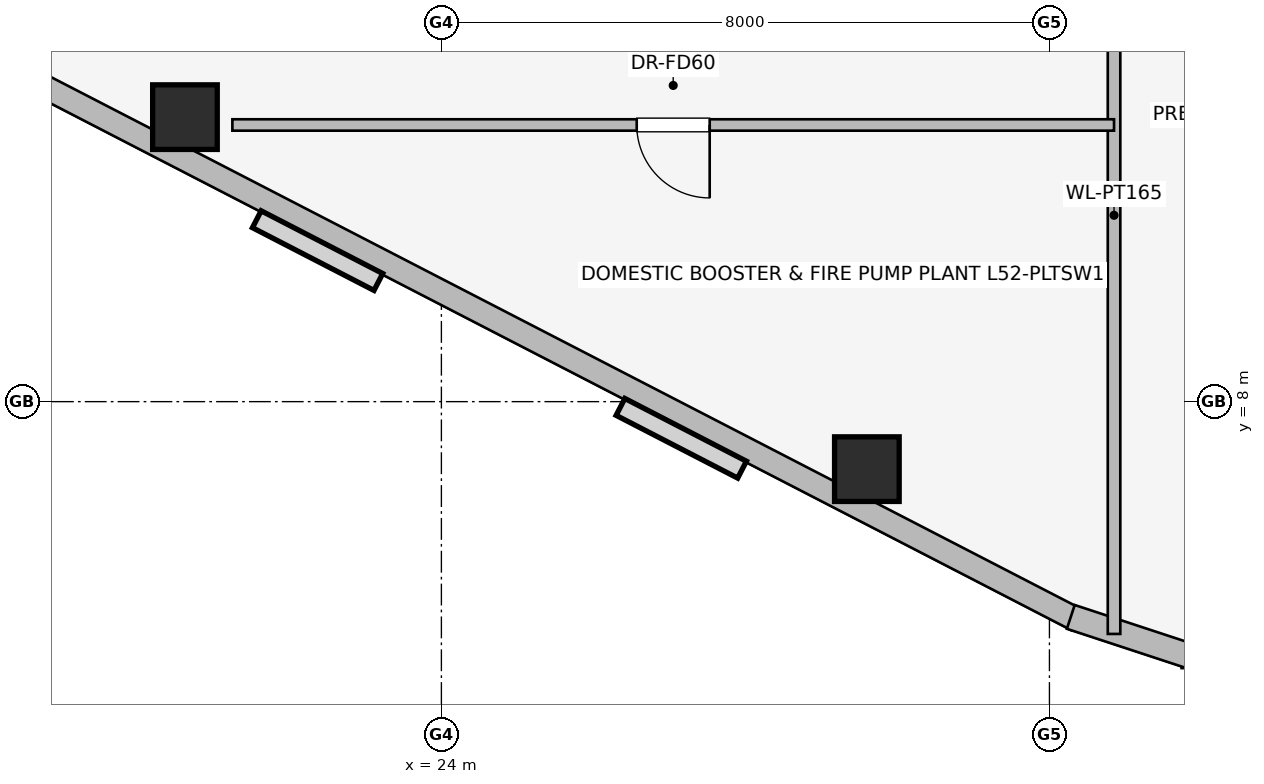
"""IFC4 building model, lengths in metres.
Left out: names, types, materials, properties, quantities, classifications, styles, units other than length and angle.
Written with IfcOpenShell. Run it as: python <this file> out.ifc"""

import sys

from ifc_helpers import new_model, si_unit, direction, frame, frame_2d, origin, origin_2d, place, context, subcontext, project, spatial, rectangle, extrude, element, fill, save


model = new_model("IFC4")
c1 = context("Model", 3, precision=1e-05, world=origin(), true_north=direction((0.0, 1.0)))
c2 = subcontext(c1, "Body", "Model", "MODEL_VIEW")
j1 = project(units=[si_unit("LENGTHUNIT", "METRE"), si_unit("PLANEANGLEUNIT", "RADIAN")], contexts=[c1])
p1 = place(None, origin())
s1 = spatial("IfcSite", under=j1, at=p1, CompositionType="ELEMENT")
p2 = place(p1, origin())
s2 = spatial("IfcBuilding", under=s1, at=p2, CompositionType="ELEMENT")
p3 = place(p2, frame((0.0, 0.0, 191.25)))
s3 = spatial("IfcBuildingStorey", under=s2, at=p3, CompositionType="ELEMENT", Elevation=191.25)
for number, where, z_axis, x_axis in (
    (1, (20.626, 11.743, 0.0), (0.0, 0.0, 1.0), (1.0, 0.0, 0.0)),
    (2, (29.598, 7.112, 0.0), (0.0, 0.0, 1.0), (1.0, 0.0, 0.0)),
):
    element("IfcColumn", number, at=place(p3, frame(where, z_axis=z_axis, x_axis=x_axis)), inside=s3, PredefinedType="COLUMN", context=c2, shape_type="SweptSolid", body=[
        extrude(rectangle(XDim=0.85, YDim=0.85, at=origin_2d()), origin(), (0.0, 0.0, 1.0), 5.2),
    ])
p4 = place(p3, frame((32.362, 5.129, 0.0), z_axis=(0.0, 0.0, 1.0), x_axis=(-0.888626188278, 0.458632202867, 0.0)))
e3 = element("IfcWall", 3, at=p4, inside=s3, PredefinedType="STANDARD", context=c2, shape_type="SweptSolid", body=[
    extrude(rectangle(XDim=16.828, YDim=0.31, at=frame_2d((8.414, 0.0))), origin(), (0.0, 0.0, 1.0), 4.94),
])
p5 = place(p3, frame((35.461, 4.659, 0.0), z_axis=(0.0, 0.0, 1.0), x_axis=(-1.0, 0.0, 0.0)))
e4 = element("IfcWall", 4, at=p5, inside=s3, PredefinedType="STANDARD", context=c2, shape_type="SweptSolid", body=[
    extrude(rectangle(XDim=1.722, YDim=0.33, at=frame_2d((0.861, 0.0))), origin(), (0.0, 0.0, 1.0), 4.94),
])
p6 = place(p3, frame((33.917, 4.63, 0.0), z_axis=(0.0, 0.0, 1.0), x_axis=(-0.949937416267, 0.312440242569, 0.0)))
e5 = element("IfcWall", 5, at=p6, inside=s3, PredefinedType="STANDARD", context=c2, shape_type="SweptSolid", body=[
    extrude(rectangle(XDim=1.722, YDim=0.33, at=frame_2d((0.861, 0.0))), origin(), (0.0, 0.0, 1.0), 4.94),
])
p7 = place(p3, frame((32.85, 4.944, 0.0), z_axis=(0.0, 0.0, 1.0), x_axis=(0.0, 1.0, 0.0)))
e6 = element("IfcWall", 6, at=p7, inside=s3, PredefinedType="PARTITIONING", context=c2, shape_type="SweptSolid", body=[
    extrude(rectangle(XDim=11.016, YDim=0.165, at=frame_2d((5.508, 0.0))), origin(), (0.0, 0.0, 1.0), 4.94),
])
p8 = place(p3, frame((32.85, 11.64, 0.0), z_axis=(0.0, 0.0, 1.0), x_axis=(-1.0, 0.0, 0.0)))
e7 = element("IfcWall", 7, at=p8, inside=s3, PredefinedType="PARTITIONING", context=c2, shape_type="SweptSolid", body=[
    extrude(rectangle(XDim=11.6, YDim=0.15, at=frame_2d((5.8, 0.0))), origin(), (0.0, 0.0, 1.0), 4.94),
])
p9 = place(p8, frame((5.32, 0.0, 0.0)))
e8 = element("IfcOpeningElement", 8, at=p9, cuts=e7, PredefinedType="OPENING", context=c2, shape_type="SweptSolid", body=[
    extrude(rectangle(XDim=0.96, YDim=2.0, at=frame_2d((0.48, 1.0))), frame((0.0, 0.085, 0.0), z_axis=(0.0, -1.0, 0.0), x_axis=(1.0, 0.0, 0.0)), (0.0, 0.0, 1.0), 0.17),
])
p10 = place(p9, origin())
e9 = element("IfcDoor", 9, at=p10, inside=s3, OperationType="SINGLE_SWING_LEFT", PredefinedType="DOOR", context=c2, shape_type="SweptSolid", body=[
    extrude(rectangle(XDim=0.96, YDim=2.0, at=frame_2d((0.48, 1.0))), frame((0.0, 0.025, 0.0), z_axis=(0.0, -1.0, 0.0), x_axis=(1.0, 0.0, 0.0)), (0.0, 0.0, 1.0), 0.05),
])
fill(e8, e9)
save(model, sys.argv[1])
